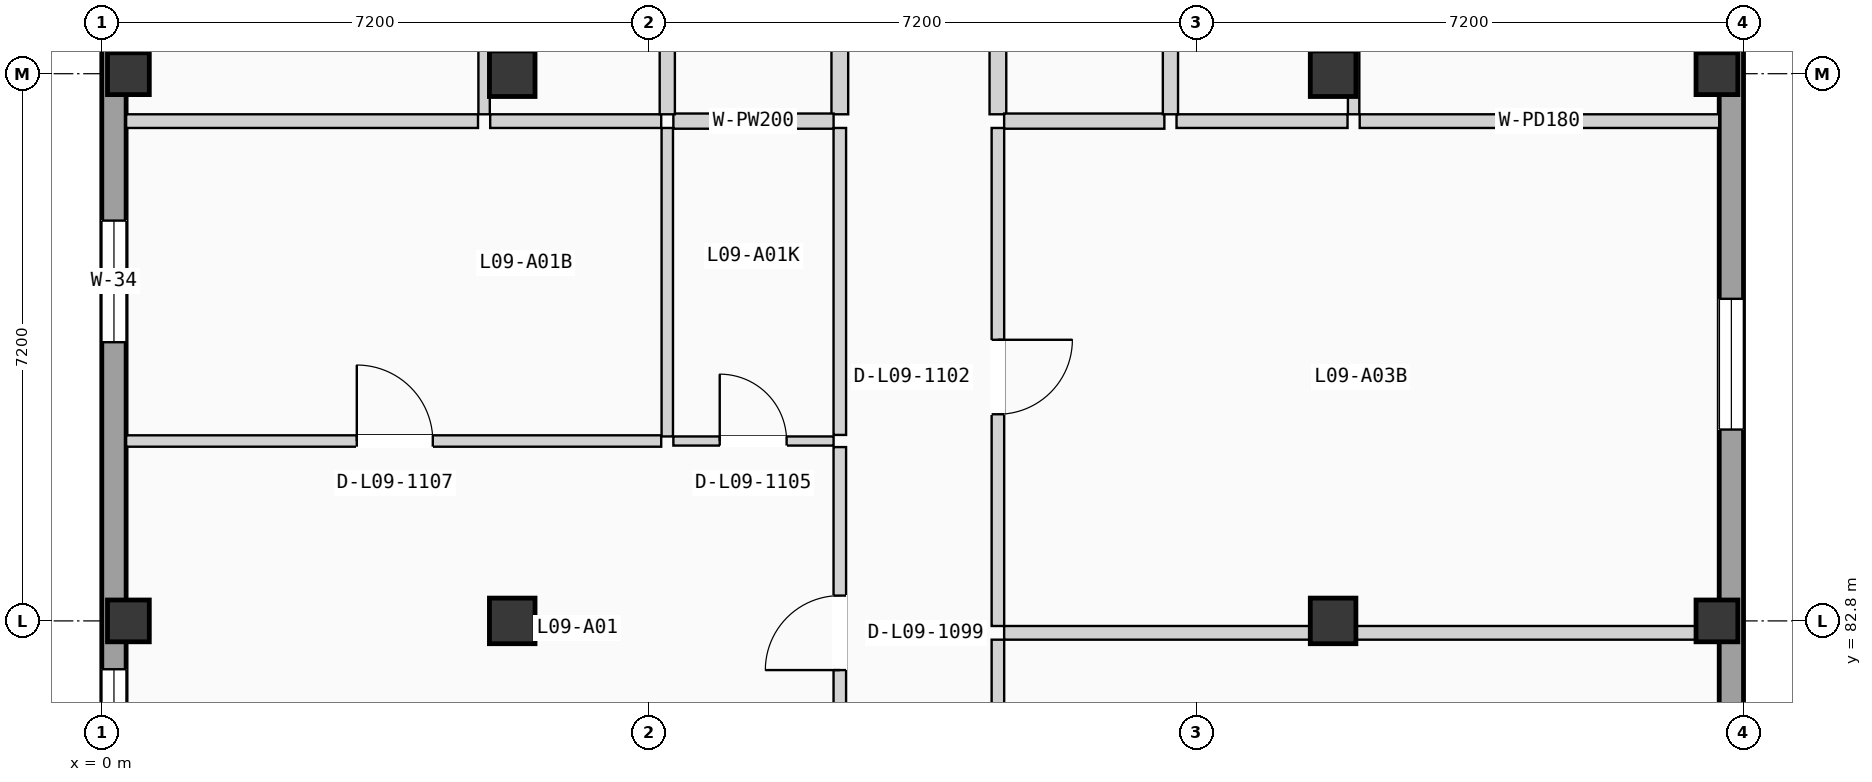
"""IFC4 building model, lengths in metres.
Left out: names, types, materials, properties, quantities, classifications, styles, units other than length and angle.
Written with IfcOpenShell. Run it as: python <this file> out.ifc"""

import sys

from ifc_helpers import new_model, si_unit, direction, frame, frame_2d, origin, origin_2d, place, context, subcontext, project, spatial, rectangle, extrude, element, fill, save


model = new_model("IFC4")
c1 = context("Model", 3, precision=1e-05, world=origin(), true_north=direction((0.0, 1.0)))
c2 = subcontext(c1, "Body", "Model", "MODEL_VIEW")
j1 = project(units=[si_unit("LENGTHUNIT", "METRE"), si_unit("PLANEANGLEUNIT", "RADIAN")], contexts=[c1])
p1 = place(None, origin())
s1 = spatial("IfcSite", under=j1, at=p1, CompositionType="ELEMENT")
p2 = place(p1, origin())
s2 = spatial("IfcBuilding", under=s1, at=p2, CompositionType="ELEMENT")
p3 = place(p2, frame((0.0, 0.0, 30.975)))
s3 = spatial("IfcBuildingStorey", under=s2, at=p3, CompositionType="ELEMENT", Elevation=30.975)
for number, where, z_axis, x_axis in (
    (1, (0.35, 82.8, 0.0), (0.0, 0.0, 1.0), (1.0, 0.0, 0.0)),
    (2, (0.35, 90.0, 0.0), (0.0, 0.0, 1.0), (1.0, 0.0, 0.0)),
):
    element("IfcColumn", number, at=place(p3, frame(where, z_axis=z_axis, x_axis=x_axis)), inside=s3, PredefinedType="COLUMN", context=c2, shape_type="SweptSolid", body=[
        extrude(rectangle(XDim=0.55, YDim=0.55, at=origin_2d()), origin(), (0.0, 0.0, 1.0), 3.15),
    ])
for number, where, z_axis, x_axis in (
    (3, (5.4, 82.8, 0.0), (0.0, 0.0, 1.0), (1.0, 0.0, 0.0)),
    (4, (5.4, 90.0, 0.0), (0.0, 0.0, 1.0), (1.0, 0.0, 0.0)),
    (5, (16.2, 82.8, 0.0), (0.0, 0.0, 1.0), (1.0, 0.0, 0.0)),
    (6, (16.2, 90.0, 0.0), (0.0, 0.0, 1.0), (1.0, 0.0, 0.0)),
):
    element("IfcColumn", number, at=place(p3, frame(where, z_axis=z_axis, x_axis=x_axis)), inside=s3, PredefinedType="COLUMN", context=c2, shape_type="SweptSolid", body=[
        extrude(rectangle(XDim=0.6, YDim=0.6, at=origin_2d()), origin(), (0.0, 0.0, 1.0), 3.15),
    ])
for number, where, z_axis, x_axis in (
    (7, (21.25, 82.8, 0.0), (0.0, 0.0, 1.0), (1.0, 0.0, 0.0)),
    (8, (21.25, 90.0, 0.0), (0.0, 0.0, 1.0), (1.0, 0.0, 0.0)),
):
    element("IfcColumn", number, at=place(p3, frame(where, z_axis=z_axis, x_axis=x_axis)), inside=s3, PredefinedType="COLUMN", context=c2, shape_type="SweptSolid", body=[
        extrude(rectangle(XDim=0.55, YDim=0.55, at=origin_2d()), origin(), (0.0, 0.0, 1.0), 3.15),
    ])
p4 = place(p3, frame((0.16, 68.72, 0.0), z_axis=(0.0, 0.0, 1.0), x_axis=(0.0, 1.0, 0.0)))
e9 = element("IfcWall", 9, at=p4, inside=s3, PredefinedType="SOLIDWALL", context=c2, shape_type="SweptSolid", body=[
    extrude(rectangle(XDim=49.76, YDim=0.32, at=frame_2d((24.88, 0.0))), origin(), (0.0, 0.0, 1.0), 2.9),
])
p5 = place(p4, frame((11.844, 0.0, 0.865)))
e10 = element("IfcOpeningElement", 10, at=p5, cuts=e9, PredefinedType="OPENING", context=c2, shape_type="SweptSolid", body=[
    extrude(rectangle(XDim=1.6, YDim=1.35, at=frame_2d((0.8, 0.675))), frame((0.0, 0.17, 0.0), z_axis=(0.0, -1.0, 0.0), x_axis=(1.0, 0.0, 0.0)), (0.0, 0.0, 1.0), 0.34),
])
p6 = place(p4, frame((8.499, 0.0, 0.715)))
e11 = element("IfcOpeningElement", 11, at=p6, cuts=e9, PredefinedType="OPENING", context=c2, shape_type="SweptSolid", body=[
    extrude(rectangle(XDim=1.6, YDim=1.5, at=frame_2d((0.8, 0.75))), frame((0.0, 0.17, 0.0), z_axis=(0.0, -1.0, 0.0), x_axis=(1.0, 0.0, 0.0)), (0.0, 0.0, 1.0), 0.34),
])
p7 = place(p4, frame((17.747, 0.0, 0.565)))
e12 = element("IfcOpeningElement", 12, at=p7, cuts=e9, PredefinedType="OPENING", context=c2, shape_type="SweptSolid", body=[
    extrude(rectangle(XDim=1.6, YDim=1.65, at=frame_2d((0.8, 0.825))), frame((0.0, 0.17, 0.0), z_axis=(0.0, -1.0, 0.0), x_axis=(1.0, 0.0, 0.0)), (0.0, 0.0, 1.0), 0.34),
])
p8 = place(p4, frame((31.225, 0.0, 0.85)))
e13 = element("IfcOpeningElement", 13, at=p8, cuts=e9, PredefinedType="OPENING", context=c2, shape_type="SweptSolid", body=[
    extrude(rectangle(XDim=0.95, YDim=1.2, at=frame_2d((0.475, 0.6))), frame((0.0, 0.17, 0.0), z_axis=(0.0, -1.0, 0.0), x_axis=(1.0, 0.0, 0.0)), (0.0, 0.0, 1.0), 0.34),
])
p9 = place(p4, frame((23.617, 0.0, 0.9)))
e14 = element("IfcOpeningElement", 14, at=p9, cuts=e9, PredefinedType="OPENING", context=c2, shape_type="SweptSolid", body=[
    extrude(rectangle(XDim=1.72, YDim=1.2, at=frame_2d((0.86, 0.6))), frame((0.0, 0.17, 0.0), z_axis=(0.0, -1.0, 0.0), x_axis=(1.0, 0.0, 0.0)), (0.0, 0.0, 1.0), 0.34),
])
p10 = place(p4, frame((38.355, 0.0, 0.865)))
e15 = element("IfcOpeningElement", 15, at=p10, cuts=e9, PredefinedType="OPENING", context=c2, shape_type="SweptSolid", body=[
    extrude(rectangle(XDim=1.72, YDim=1.35, at=frame_2d((0.86, 0.675))), frame((0.0, 0.17, 0.0), z_axis=(0.0, -1.0, 0.0), x_axis=(1.0, 0.0, 0.0)), (0.0, 0.0, 1.0), 0.34),
])
p11 = place(p3, frame((21.44, 68.72, 0.0), z_axis=(0.0, 0.0, 1.0), x_axis=(0.0, 1.0, 0.0)))
e16 = element("IfcWall", 16, at=p11, inside=s3, PredefinedType="SOLIDWALL", context=c2, shape_type="SweptSolid", body=[
    extrude(rectangle(XDim=49.76, YDim=0.32, at=frame_2d((24.88, 0.0))), origin(), (0.0, 0.0, 1.0), 2.9),
])
p12 = place(p11, frame((9.685, 0.0, 0.715)))
e17 = element("IfcOpeningElement", 17, at=p12, cuts=e16, PredefinedType="OPENING", context=c2, shape_type="SweptSolid", body=[
    extrude(rectangle(XDim=1.72, YDim=1.5, at=frame_2d((0.86, 0.75))), frame((0.0, 0.17, 0.0), z_axis=(0.0, -1.0, 0.0), x_axis=(1.0, 0.0, 0.0)), (0.0, 0.0, 1.0), 0.34),
])
p13 = place(p11, frame((16.598, 0.0, 0.565)))
e18 = element("IfcOpeningElement", 18, at=p13, cuts=e16, PredefinedType="OPENING", context=c2, shape_type="SweptSolid", body=[
    extrude(rectangle(XDim=1.72, YDim=1.65, at=frame_2d((0.86, 0.825))), frame((0.0, 0.17, 0.0), z_axis=(0.0, -1.0, 0.0), x_axis=(1.0, 0.0, 0.0)), (0.0, 0.0, 1.0), 0.34),
])
p14 = place(p11, frame((31.225, 0.0, 0.85)))
e19 = element("IfcOpeningElement", 19, at=p14, cuts=e16, PredefinedType="OPENING", context=c2, shape_type="SweptSolid", body=[
    extrude(rectangle(XDim=0.95, YDim=1.2, at=frame_2d((0.475, 0.6))), frame((0.0, 0.17, 0.0), z_axis=(0.0, -1.0, 0.0), x_axis=(1.0, 0.0, 0.0)), (0.0, 0.0, 1.0), 0.34),
])
p15 = place(p11, frame((23.552, 0.0, 0.9)))
e20 = element("IfcOpeningElement", 20, at=p15, cuts=e16, PredefinedType="OPENING", context=c2, shape_type="SweptSolid", body=[
    extrude(rectangle(XDim=1.85, YDim=1.2, at=frame_2d((0.925, 0.6))), frame((0.0, 0.17, 0.0), z_axis=(0.0, -1.0, 0.0), x_axis=(1.0, 0.0, 0.0)), (0.0, 0.0, 1.0), 0.34),
])
p16 = place(p11, frame((38.29, 0.0, 0.865)))
e21 = element("IfcOpeningElement", 21, at=p16, cuts=e16, PredefinedType="OPENING", context=c2, shape_type="SweptSolid", body=[
    extrude(rectangle(XDim=1.85, YDim=1.35, at=frame_2d((0.925, 0.675))), frame((0.0, 0.17, 0.0), z_axis=(0.0, -1.0, 0.0), x_axis=(1.0, 0.0, 0.0)), (0.0, 0.0, 1.0), 0.34),
])
p17 = place(p3, frame((9.71, 80.199, 0.0), z_axis=(0.0, 0.0, 1.0), x_axis=(0.0, 1.0, 0.0)))
e22 = element("IfcWall", 22, at=p17, inside=s3, PredefinedType="PARTITIONING", context=c2, shape_type="SweptSolid", body=[
    extrude(rectangle(XDim=4.888, YDim=0.165, at=frame_2d((2.444, 0.0))), origin(), (0.0, 0.0, 1.0), 2.87),
])
p18 = place(p17, frame((1.954, 0.0, 0.0)))
e23 = element("IfcOpeningElement", 23, at=p18, cuts=e22, PredefinedType="OPENING", context=c2, shape_type="SweptSolid", body=[
    extrude(rectangle(XDim=0.98, YDim=2.08, at=frame_2d((0.49, 1.04))), frame((0.0, 0.093, 0.0), z_axis=(0.0, -1.0, 0.0), x_axis=(1.0, 0.0, 0.0)), (0.0, 0.0, 1.0), 0.185),
])
p19 = place(p3, frame((9.71, 85.247, 0.0), z_axis=(0.0, 0.0, 1.0), x_axis=(0.0, 1.0, 0.0)))
e24 = element("IfcWall", 24, at=p19, inside=s3, PredefinedType="PARTITIONING", context=c2, shape_type="SweptSolid", body=[
    extrude(rectangle(XDim=4.039, YDim=0.165, at=frame_2d((2.02, 0.0))), origin(), (0.0, 0.0, 1.0), 2.87),
])
p20 = place(p3, frame((9.71, 89.466, 0.0), z_axis=(0.0, 0.0, 1.0), x_axis=(0.0, 1.0, 0.0)))
e25 = element("IfcWall", 25, at=p20, inside=s3, PredefinedType="PLUMBINGWALL", context=c2, shape_type="SweptSolid", body=[
    extrude(rectangle(XDim=6.658, YDim=0.22, at=frame_2d((3.329, 0.0))), origin(), (0.0, 0.0, 1.0), 2.87),
])
p21 = place(p3, frame((11.79, 75.945, 0.0), z_axis=(0.0, 0.0, 1.0), x_axis=(0.0, 1.0, 0.0)))
e26 = element("IfcWall", 26, at=p21, inside=s3, PredefinedType="PARTITIONING", context=c2, shape_type="SweptSolid", body=[
    extrude(rectangle(XDim=6.608, YDim=0.165, at=frame_2d((3.304, 0.0))), origin(), (0.0, 0.0, 1.0), 2.87),
])
p22 = place(p21, frame((2.842, 0.0, 0.0)))
e27 = element("IfcOpeningElement", 27, at=p22, cuts=e26, PredefinedType="OPENING", context=c2, shape_type="SweptSolid", body=[
    extrude(rectangle(XDim=0.98, YDim=2.08, at=frame_2d((0.49, 1.04))), frame((0.0, 0.093, 0.0), z_axis=(0.0, -1.0, 0.0), x_axis=(1.0, 0.0, 0.0)), (0.0, 0.0, 1.0), 0.185),
])
p23 = place(p3, frame((11.79, 82.733, 0.0), z_axis=(0.0, 0.0, 1.0), x_axis=(0.0, 1.0, 0.0)))
e28 = element("IfcWall", 28, at=p23, inside=s3, PredefinedType="PARTITIONING", context=c2, shape_type="SweptSolid", body=[
    extrude(rectangle(XDim=6.553, YDim=0.165, at=frame_2d((3.276, 0.0))), origin(), (0.0, 0.0, 1.0), 2.87),
])
p24 = place(p23, frame((2.786, 0.0, 0.0)))
e29 = element("IfcOpeningElement", 29, at=p24, cuts=e28, PredefinedType="OPENING", context=c2, shape_type="SweptSolid", body=[
    extrude(rectangle(XDim=0.98, YDim=2.08, at=frame_2d((0.49, 1.04))), frame((0.0, 0.093, 0.0), z_axis=(0.0, -1.0, 0.0), x_axis=(1.0, 0.0, 0.0)), (0.0, 0.0, 1.0), 0.185),
])
p25 = place(p3, frame((11.79, 89.466, 0.0), z_axis=(0.0, 0.0, 1.0), x_axis=(0.0, 1.0, 0.0)))
e30 = element("IfcWall", 30, at=p25, inside=s3, PredefinedType="PLUMBINGWALL", context=c2, shape_type="SweptSolid", body=[
    extrude(rectangle(XDim=6.658, YDim=0.22, at=frame_2d((3.329, 0.0))), origin(), (0.0, 0.0, 1.0), 2.87),
])
p26 = place(p3, frame((7.52, 85.167, 0.0), z_axis=(0.0, 0.0, 1.0), x_axis=(1.0, 0.0, 0.0)))
e31 = element("IfcWall", 31, at=p26, inside=s3, PredefinedType="PARTITIONING", context=c2, shape_type="SweptSolid", body=[
    extrude(rectangle(XDim=2.108, YDim=0.12, at=frame_2d((1.054, 0.0))), origin(), (0.0, 0.0, 1.0), 2.87),
])
p27 = place(p26, frame((0.61, 0.0, 0.0)))
e32 = element("IfcOpeningElement", 32, at=p27, cuts=e31, PredefinedType="OPENING", context=c2, shape_type="SweptSolid", body=[
    extrude(rectangle(XDim=0.88, YDim=2.02, at=frame_2d((0.44, 1.01))), frame((0.0, 0.07, 0.0), z_axis=(0.0, -1.0, 0.0), x_axis=(1.0, 0.0, 0.0)), (0.0, 0.0, 1.0), 0.14),
])
p28 = place(p3, frame((0.32, 85.167, 0.0), z_axis=(0.0, 0.0, 1.0), x_axis=(1.0, 0.0, 0.0)))
e33 = element("IfcWall", 33, at=p28, inside=s3, PredefinedType="PARTITIONING", context=c2, shape_type="SweptSolid", body=[
    extrude(rectangle(XDim=7.04, YDim=0.15, at=frame_2d((3.52, 0.0))), origin(), (0.0, 0.0, 1.0), 2.87),
])
p29 = place(p28, frame((3.035, 0.0, 0.0)))
e34 = element("IfcOpeningElement", 34, at=p29, cuts=e33, PredefinedType="OPENING", context=c2, shape_type="SweptSolid", body=[
    extrude(rectangle(XDim=1.0, YDim=2.06, at=frame_2d((0.5, 1.03))), frame((0.0, 0.085, 0.0), z_axis=(0.0, -1.0, 0.0), x_axis=(1.0, 0.0, 0.0)), (0.0, 0.0, 1.0), 0.17),
])
p30 = place(p3, frame((7.44, 85.227, 0.0), z_axis=(0.0, 0.0, 1.0), x_axis=(0.0, 1.0, 0.0)))
e35 = element("IfcWall", 35, at=p30, inside=s3, PredefinedType="PARTITIONING", context=c2, shape_type="SweptSolid", body=[
    extrude(rectangle(XDim=4.059, YDim=0.15, at=frame_2d((2.029, 0.0))), origin(), (0.0, 0.0, 1.0), 2.87),
])
p31 = place(p3, frame((7.52, 89.376, 0.0), z_axis=(0.0, 0.0, 1.0), x_axis=(1.0, 0.0, 0.0)))
e36 = element("IfcWall", 36, at=p31, inside=s3, PredefinedType="PLUMBINGWALL", context=c2, shape_type="SweptSolid", body=[
    extrude(rectangle(XDim=2.108, YDim=0.2, at=frame_2d((1.054, 0.0))), origin(), (0.0, 0.0, 1.0), 2.87),
])
p32 = place(p3, frame((0.32, 89.376, 0.0), z_axis=(0.0, 0.0, 1.0), x_axis=(1.0, 0.0, 0.0)))
e37 = element("IfcWall", 37, at=p32, inside=s3, PredefinedType="PARTITIONING", context=c2, shape_type="SweptSolid", body=[
    extrude(rectangle(XDim=4.63, YDim=0.18, at=frame_2d((2.315, 0.0))), origin(), (0.0, 0.0, 1.0), 2.87),
])
p33 = place(p3, frame((5.11, 89.376, 0.0), z_axis=(0.0, 0.0, 1.0), x_axis=(1.0, 0.0, 0.0)))
e38 = element("IfcWall", 38, at=p33, inside=s3, PredefinedType="PARTITIONING", context=c2, shape_type="SweptSolid", body=[
    extrude(rectangle(XDim=2.25, YDim=0.18, at=frame_2d((1.125, 0.0))), origin(), (0.0, 0.0, 1.0), 2.87),
])
p34 = place(p3, frame((7.44, 89.466, 0.0), z_axis=(0.0, 0.0, 1.0), x_axis=(0.0, 1.0, 0.0)))
e39 = element("IfcWall", 39, at=p34, inside=s3, PredefinedType="PLUMBINGWALL", context=c2, shape_type="SweptSolid", body=[
    extrude(rectangle(XDim=6.678, YDim=0.2, at=frame_2d((3.339, 0.0))), origin(), (0.0, 0.0, 1.0), 2.87),
])
p35 = place(p34, frame((2.904, 0.0, 0.0)))
e40 = element("IfcOpeningElement", 40, at=p35, cuts=e39, PredefinedType="OPENING", context=c2, shape_type="SweptSolid", body=[
    extrude(rectangle(XDim=0.85, YDim=2.01, at=frame_2d((0.425, 1.005))), frame((0.0, 0.11, 0.0), z_axis=(0.0, -1.0, 0.0), x_axis=(1.0, 0.0, 0.0)), (0.0, 0.0, 1.0), 0.22),
])
p36 = place(p3, frame((5.03, 89.466, 0.0), z_axis=(0.0, 0.0, 1.0), x_axis=(0.0, 1.0, 0.0)))
e41 = element("IfcWall", 41, at=p36, inside=s3, PredefinedType="PARTITIONING", context=c2, shape_type="SweptSolid", body=[
    extrude(rectangle(XDim=6.678, YDim=0.15, at=frame_2d((3.339, 0.0))), origin(), (0.0, 0.0, 1.0), 2.87),
])
p37 = place(p3, frame((11.872, 82.643, 0.0), z_axis=(0.0, 0.0, 1.0), x_axis=(1.0, 0.0, 0.0)))
e42 = element("IfcWall", 42, at=p37, inside=s3, PredefinedType="PARTITIONING", context=c2, shape_type="SweptSolid", body=[
    extrude(rectangle(XDim=9.408, YDim=0.18, at=frame_2d((4.704, 0.0))), origin(), (0.0, 0.0, 1.0), 2.17),
])
p38 = place(p3, frame((11.872, 89.376, 0.0), z_axis=(0.0, 0.0, 1.0), x_axis=(1.0, 0.0, 0.0)))
e43 = element("IfcWall", 43, at=p38, inside=s3, PredefinedType="PLUMBINGWALL", context=c2, shape_type="SweptSolid", body=[
    extrude(rectangle(XDim=2.108, YDim=0.2, at=frame_2d((1.054, 0.0))), origin(), (0.0, 0.0, 1.0), 2.87),
])
p39 = place(p3, frame((16.55, 89.376, 0.0), z_axis=(0.0, 0.0, 1.0), x_axis=(1.0, 0.0, 0.0)))
e44 = element("IfcWall", 44, at=p39, inside=s3, PredefinedType="PARTITIONING", context=c2, shape_type="SweptSolid", body=[
    extrude(rectangle(XDim=4.73, YDim=0.18, at=frame_2d((2.365, 0.0))), origin(), (0.0, 0.0, 1.0), 2.87),
])
p40 = place(p3, frame((14.14, 89.376, 0.0), z_axis=(0.0, 0.0, 1.0), x_axis=(1.0, 0.0, 0.0)))
e45 = element("IfcWall", 45, at=p40, inside=s3, PredefinedType="PARTITIONING", context=c2, shape_type="SweptSolid", body=[
    extrude(rectangle(XDim=2.25, YDim=0.18, at=frame_2d((1.125, 0.0))), origin(), (0.0, 0.0, 1.0), 2.87),
])
p41 = place(p3, frame((14.06, 89.466, 0.0), z_axis=(0.0, 0.0, 1.0), x_axis=(0.0, 1.0, 0.0)))
e46 = element("IfcWall", 46, at=p41, inside=s3, PredefinedType="PLUMBINGWALL", context=c2, shape_type="SweptSolid", body=[
    extrude(rectangle(XDim=6.678, YDim=0.2, at=frame_2d((3.339, 0.0))), origin(), (0.0, 0.0, 1.0), 2.87),
])
p42 = place(p41, frame((2.904, 0.0, 0.0)))
e47 = element("IfcOpeningElement", 47, at=p42, cuts=e46, PredefinedType="OPENING", context=c2, shape_type="SweptSolid", body=[
    extrude(rectangle(XDim=0.85, YDim=2.01, at=frame_2d((0.425, 1.005))), frame((0.0, 0.11, 0.0), z_axis=(0.0, -1.0, 0.0), x_axis=(1.0, 0.0, 0.0)), (0.0, 0.0, 1.0), 0.22),
])
p43 = place(p3, frame((16.47, 89.466, 0.0), z_axis=(0.0, 0.0, 1.0), x_axis=(0.0, 1.0, 0.0)))
e48 = element("IfcWall", 48, at=p43, inside=s3, PredefinedType="PARTITIONING", context=c2, shape_type="SweptSolid", body=[
    extrude(rectangle(XDim=6.678, YDim=0.15, at=frame_2d((3.339, 0.0))), origin(), (0.0, 0.0, 1.0), 2.87),
])
p44 = place(p5, origin())
e49 = element("IfcWindow", 49, at=p44, inside=s3, PartitioningType="DOUBLE_PANEL_VERTICAL", PredefinedType="WINDOW", context=c2, shape_type="SweptSolid", body=[
    extrude(rectangle(XDim=1.6, YDim=1.35, at=frame_2d((0.8, 0.675))), frame((0.0, 0.03, 0.0), z_axis=(0.0, -1.0, 0.0), x_axis=(1.0, 0.0, 0.0)), (0.0, 0.0, 1.0), 0.06),
])
fill(e10, e49)
p45 = place(p7, origin())
e50 = element("IfcWindow", 50, at=p45, inside=s3, PartitioningType="DOUBLE_PANEL_VERTICAL", PredefinedType="WINDOW", context=c2, shape_type="SweptSolid", body=[
    extrude(rectangle(XDim=1.6, YDim=1.65, at=frame_2d((0.8, 0.825))), frame((0.0, 0.03, 0.0), z_axis=(0.0, -1.0, 0.0), x_axis=(1.0, 0.0, 0.0)), (0.0, 0.0, 1.0), 0.06),
])
fill(e12, e50)
p46 = place(p13, origin())
e51 = element("IfcWindow", 51, at=p46, inside=s3, PartitioningType="DOUBLE_PANEL_VERTICAL", PredefinedType="WINDOW", context=c2, shape_type="SweptSolid", body=[
    extrude(rectangle(XDim=1.72, YDim=1.65, at=frame_2d((0.86, 0.825))), frame((0.0, 0.03, 0.0), z_axis=(0.0, -1.0, 0.0), x_axis=(1.0, 0.0, 0.0)), (0.0, 0.0, 1.0), 0.06),
])
fill(e18, e51)
p47 = place(p18, origin())
e52 = element("IfcDoor", 52, at=p47, inside=s3, OperationType="SINGLE_SWING_LEFT", PredefinedType="DOOR", context=c2, shape_type="SweptSolid", body=[
    extrude(rectangle(XDim=0.98, YDim=2.08, at=frame_2d((0.49, 1.04))), frame((0.0, 0.025, 0.0), z_axis=(0.0, -1.0, 0.0), x_axis=(1.0, 0.0, 0.0)), (0.0, 0.0, 1.0), 0.05),
])
fill(e23, e52)
p48 = place(p24, frame((0.98, 0.0, 0.0), z_axis=(0.0, 0.0, 1.0), x_axis=(-1.0, 0.0, 0.0)))
e53 = element("IfcDoor", 53, at=p48, inside=s3, OperationType="SINGLE_SWING_RIGHT", PredefinedType="DOOR", context=c2, shape_type="SweptSolid", body=[
    extrude(rectangle(XDim=0.98, YDim=2.08, at=frame_2d((0.49, 1.04))), frame((0.0, 0.025, 0.0), z_axis=(0.0, -1.0, 0.0), x_axis=(1.0, 0.0, 0.0)), (0.0, 0.0, 1.0), 0.05),
])
fill(e29, e53)
p49 = place(p27, origin())
e54 = element("IfcDoor", 54, at=p49, inside=s3, OperationType="SINGLE_SWING_LEFT", PredefinedType="DOOR", context=c2, shape_type="SweptSolid", body=[
    extrude(rectangle(XDim=0.88, YDim=2.02, at=frame_2d((0.44, 1.01))), frame((0.0, 0.025, 0.0), z_axis=(0.0, -1.0, 0.0), x_axis=(1.0, 0.0, 0.0)), (0.0, 0.0, 1.0), 0.05),
])
fill(e32, e54)
p50 = place(p29, origin())
e55 = element("IfcDoor", 55, at=p50, inside=s3, OperationType="SINGLE_SWING_LEFT", PredefinedType="DOOR", context=c2, shape_type="SweptSolid", body=[
    extrude(rectangle(XDim=1.0, YDim=2.06, at=frame_2d((0.5, 1.03))), frame((0.0, 0.025, 0.0), z_axis=(0.0, -1.0, 0.0), x_axis=(1.0, 0.0, 0.0)), (0.0, 0.0, 1.0), 0.05),
])
fill(e34, e55)
save(model, sys.argv[1])
